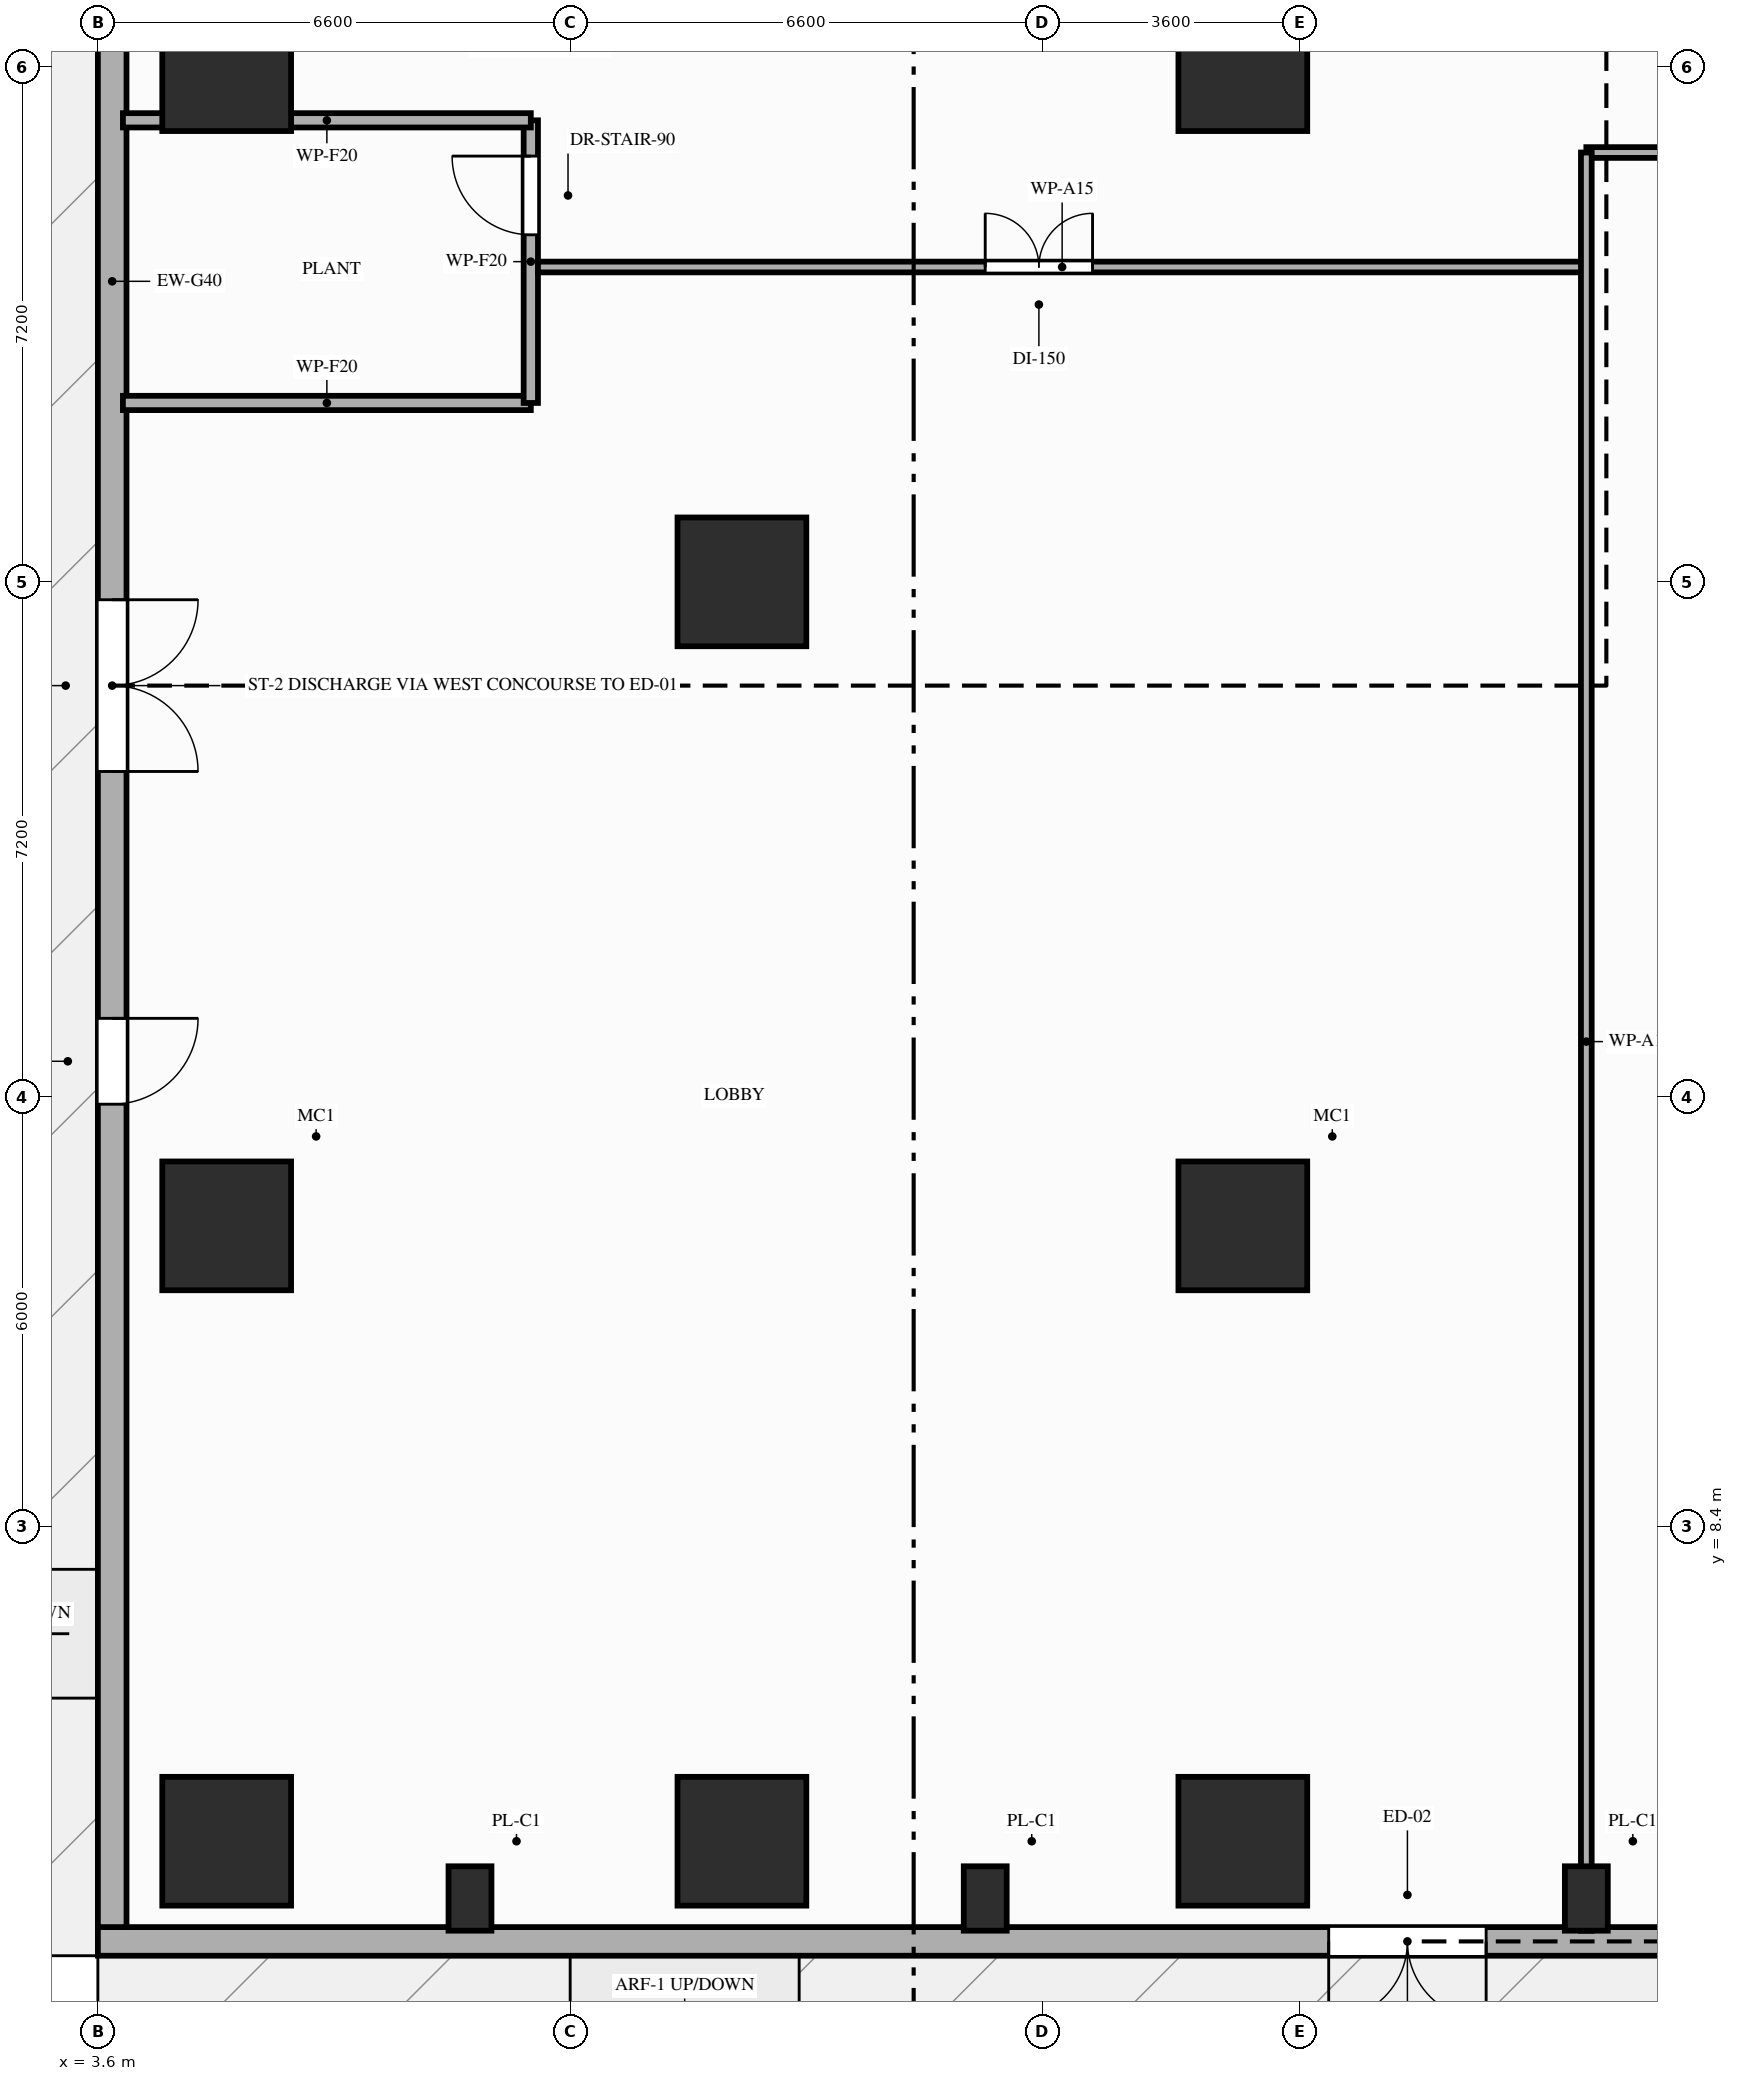
"""IFC4 building model, lengths in metres.
Left out: names, types, materials, properties, quantities, classifications, styles, units other than length and angle.
Written with IfcOpenShell. Run it as: python <this file> out.ifc"""

import sys

from ifc_helpers import new_model, si_unit, direction, frame, frame_2d, origin, origin_2d, place, context, subcontext, project, spatial, rectangle, extrude, element, fill, save


model = new_model("IFC4")
c1 = context("Model", 3, precision=1e-05, world=origin(), true_north=direction((0.0, 1.0)))
c2 = subcontext(c1, "Body", "Model", "MODEL_VIEW")
j1 = project(units=[si_unit("LENGTHUNIT", "METRE"), si_unit("PLANEANGLEUNIT", "RADIAN")], contexts=[c1])
p1 = place(None, origin())
s1 = spatial("IfcSite", under=j1, at=p1, CompositionType="ELEMENT")
p2 = place(p1, origin())
s2 = spatial("IfcBuilding", under=s1, at=p2, CompositionType="ELEMENT")
p3 = place(p2, origin())
s3 = spatial("IfcBuildingStorey", under=s2, at=p3, CompositionType="ELEMENT", Elevation=0.0)
for number, where, z_axis, x_axis in (
    (1, (5.4, 12.6, 0.0), (0.0, 0.0, 1.0), (1.0, 0.0, 0.0)),
    (2, (19.6, 12.6, 0.0), (0.0, 0.0, 1.0), (1.0, 0.0, 0.0)),
    (3, (5.4, 28.8, 0.0), (0.0, 0.0, 1.0), (1.0, 0.0, 0.0)),
    (4, (19.6, 28.8, 0.0), (0.0, 0.0, 1.0), (1.0, 0.0, 0.0)),
    (5, (5.4, 4.0, 0.0), (0.0, 0.0, 1.0), (1.0, 0.0, 0.0)),
    (6, (12.6, 4.0, 0.0), (0.0, 0.0, 1.0), (1.0, 0.0, 0.0)),
    (7, (19.6, 4.0, 0.0), (0.0, 0.0, 1.0), (1.0, 0.0, 0.0)),
    (8, (12.6, 21.6, 0.0), (0.0, 0.0, 1.0), (1.0, 0.0, 0.0)),
):
    element("IfcColumn", number, at=place(p3, frame(where, z_axis=z_axis, x_axis=x_axis)), inside=s3, PredefinedType="COLUMN", context=c2, shape_type="SweptSolid", body=[
        extrude(rectangle(XDim=1.8, YDim=1.8, at=origin_2d()), origin(), (0.0, 0.0, 1.0), 4.6),
    ])
for number, where, z_axis, x_axis in (
    (9, (8.8, 3.2, 0.0), (0.0, 0.0, 1.0), (1.0, 0.0, 0.0)),
    (10, (16.0, 3.2, 0.0), (0.0, 0.0, 1.0), (1.0, 0.0, 0.0)),
    (11, (24.4, 3.2, 0.0), (0.0, 0.0, 1.0), (1.0, 0.0, 0.0)),
):
    element("IfcColumn", number, at=place(p3, frame(where, z_axis=z_axis, x_axis=x_axis)), inside=s3, PredefinedType="PILASTER", context=c2, shape_type="SweptSolid", body=[
        extrude(rectangle(XDim=0.6, YDim=0.9, at=origin_2d()), origin(), (0.0, 0.0, 1.0), 4.6),
    ])
p4 = place(p3, frame((3.6, 2.6, 0.0), z_axis=(0.0, 0.0, 1.0), x_axis=(1.0, 0.0, 0.0)))
e12 = element("IfcWall", 12, at=p4, inside=s3, PredefinedType="STANDARD", context=c2, shape_type="SweptSolid", body=[
    extrude(rectangle(XDim=69.6, YDim=0.4, at=frame_2d((34.8, 0.0))), origin(), (0.0, 0.0, 1.0), 4.35),
])
p5 = place(p4, frame((24.6, 0.0, 0.9)))
e13 = element("IfcOpeningElement", 13, at=p5, cuts=e12, PredefinedType="OPENING", context=c2, shape_type="SweptSolid", body=[
    extrude(rectangle(XDim=2.8, YDim=2.2, at=frame_2d((1.4, 1.1))), frame((0.0, 0.21, 0.0), z_axis=(0.0, -1.0, 0.0), x_axis=(1.0, 0.0, 0.0)), (0.0, 0.0, 1.0), 0.42),
])
p6 = place(p4, frame((36.2, 0.0, 0.9)))
e14 = element("IfcOpeningElement", 14, at=p6, cuts=e12, PredefinedType="OPENING", context=c2, shape_type="SweptSolid", body=[
    extrude(rectangle(XDim=2.8, YDim=2.2, at=frame_2d((1.4, 1.1))), frame((0.0, 0.21, 0.0), z_axis=(0.0, -1.0, 0.0), x_axis=(1.0, 0.0, 0.0)), (0.0, 0.0, 1.0), 0.42),
])
p7 = place(p4, frame((64.0, 0.0, 0.9)))
e15 = element("IfcOpeningElement", 15, at=p7, cuts=e12, PredefinedType="OPENING", context=c2, shape_type="SweptSolid", body=[
    extrude(rectangle(XDim=2.8, YDim=2.2, at=frame_2d((1.4, 1.1))), frame((0.0, 0.21, 0.0), z_axis=(0.0, -1.0, 0.0), x_axis=(1.0, 0.0, 0.0)), (0.0, 0.0, 1.0), 0.42),
])
p8 = place(p4, frame((17.2, 0.0, 0.0)))
e16 = element("IfcOpeningElement", 16, at=p8, cuts=e12, PredefinedType="OPENING", context=c2, shape_type="SweptSolid", body=[
    extrude(rectangle(XDim=2.2, YDim=2.45, at=frame_2d((1.1, 1.225))), frame((0.0, 0.21, 0.0), z_axis=(0.0, -1.0, 0.0), x_axis=(1.0, 0.0, 0.0)), (0.0, 0.0, 1.0), 0.42),
])
p9 = place(p4, frame((48.4, 0.0, 0.0)))
e17 = element("IfcOpeningElement", 17, at=p9, cuts=e12, PredefinedType="OPENING", context=c2, shape_type="SweptSolid", body=[
    extrude(rectangle(XDim=2.0, YDim=2.4, at=frame_2d((1.0, 1.2))), frame((0.0, 0.21, 0.0), z_axis=(0.0, -1.0, 0.0), x_axis=(1.0, 0.0, 0.0)), (0.0, 0.0, 1.0), 0.42),
])
p10 = place(p3, frame((3.8, 48.8, 0.0), z_axis=(0.0, 0.0, 1.0), x_axis=(0.0, -1.0, 0.0)))
e18 = element("IfcWall", 18, at=p10, inside=s3, PredefinedType="STANDARD", context=c2, shape_type="SweptSolid", body=[
    extrude(rectangle(XDim=46.0, YDim=0.4, at=frame_2d((23.0, 0.0))), origin(), (0.0, 0.0, 1.0), 3.83),
])
p11 = place(p10, frame((27.45, 0.0, 0.0)))
e19 = element("IfcOpeningElement", 19, at=p11, cuts=e18, PredefinedType="OPENING", context=c2, shape_type="SweptSolid", body=[
    extrude(rectangle(XDim=2.4, YDim=2.5, at=frame_2d((1.2, 1.25))), frame((0.0, 0.21, 0.0), z_axis=(0.0, -1.0, 0.0), x_axis=(1.0, 0.0, 0.0)), (0.0, 0.0, 1.0), 0.42),
])
p12 = place(p10, frame((33.3, 0.0, 0.0)))
e20 = element("IfcOpeningElement", 20, at=p12, cuts=e18, PredefinedType="OPENING", context=c2, shape_type="SweptSolid", body=[
    extrude(rectangle(XDim=1.2, YDim=2.2, at=frame_2d((0.6, 1.1))), frame((0.0, 0.21, 0.0), z_axis=(0.0, -1.0, 0.0), x_axis=(1.0, 0.0, 0.0)), (0.0, 0.0, 1.0), 0.42),
])
p13 = place(p10, frame((12.8, 0.0, 0.0)))
e21 = element("IfcOpeningElement", 21, at=p13, cuts=e18, PredefinedType="OPENING", context=c2, shape_type="SweptSolid", body=[
    extrude(rectangle(XDim=1.2, YDim=2.2, at=frame_2d((0.6, 1.1))), frame((0.0, 0.21, 0.0), z_axis=(0.0, -1.0, 0.0), x_axis=(1.0, 0.0, 0.0)), (0.0, 0.0, 1.0), 0.42),
])
p14 = place(p3, frame((3.95, 24.1, 0.0), z_axis=(0.0, 0.0, 1.0), x_axis=(1.0, 0.0, 0.0)))
e22 = element("IfcWall", 22, at=p14, inside=s3, PredefinedType="PARTITIONING", context=c2, shape_type="SweptSolid", body=[
    extrude(rectangle(XDim=5.7, YDim=0.2, at=frame_2d((2.85, 0.0))), origin(), (0.0, 0.0, 1.0), 3.63),
])
p15 = place(p3, frame((9.65, 24.1, 0.0), z_axis=(0.0, 0.0, 1.0), x_axis=(0.0, 1.0, 0.0)))
e23 = element("IfcWall", 23, at=p15, inside=s3, PredefinedType="PARTITIONING", context=c2, shape_type="SweptSolid", body=[
    extrude(rectangle(XDim=3.95, YDim=0.2, at=frame_2d((1.975, 0.0))), origin(), (0.0, 0.0, 1.0), 4.35),
])
p16 = place(p15, frame((2.35, 0.0, 0.0)))
e24 = element("IfcOpeningElement", 24, at=p16, cuts=e23, PredefinedType="OPENING", context=c2, shape_type="SweptSolid", body=[
    extrude(rectangle(XDim=1.1, YDim=2.15, at=frame_2d((0.55, 1.075))), frame((0.0, 0.11, 0.0), z_axis=(0.0, -1.0, 0.0), x_axis=(1.0, 0.0, 0.0)), (0.0, 0.0, 1.0), 0.22),
])
p17 = place(p3, frame((3.95, 28.05, 0.0), z_axis=(0.0, 0.0, 1.0), x_axis=(1.0, 0.0, 0.0)))
e25 = element("IfcWall", 25, at=p17, inside=s3, PredefinedType="PARTITIONING", context=c2, shape_type="SweptSolid", body=[
    extrude(rectangle(XDim=5.7, YDim=0.2, at=frame_2d((2.85, 0.0))), origin(), (0.0, 0.0, 1.0), 3.63),
])
p18 = place(p3, frame((9.75, 26.0, 0.0), z_axis=(0.0, 0.0, 1.0), x_axis=(1.0, 0.0, 0.0)))
e26 = element("IfcWall", 26, at=p18, inside=s3, PredefinedType="PARTITIONING", context=c2, shape_type="SweptSolid", body=[
    extrude(rectangle(XDim=14.65, YDim=0.15, at=frame_2d((7.325, 0.0))), origin(), (0.0, 0.0, 1.0), 3.63),
])
p19 = place(p18, frame((6.25, 0.0, 0.0)))
e27 = element("IfcOpeningElement", 27, at=p19, cuts=e26, PredefinedType="OPENING", context=c2, shape_type="SweptSolid", body=[
    extrude(rectangle(XDim=1.5, YDim=2.18, at=frame_2d((0.75, 1.09))), frame((0.0, 0.085, 0.0), z_axis=(0.0, -1.0, 0.0), x_axis=(1.0, 0.0, 0.0)), (0.0, 0.0, 1.0), 0.17),
])
p20 = place(p3, frame((24.4, 27.6, 0.0), z_axis=(0.0, 0.0, 1.0), x_axis=(1.0, 0.0, 0.0)))
e28 = element("IfcWall", 28, at=p20, inside=s3, PredefinedType="PARTITIONING", context=c2, shape_type="SweptSolid", body=[
    extrude(rectangle(XDim=26.4, YDim=0.15, at=frame_2d((13.2, 0.0))), origin(), (0.0, 0.0, 1.0), 3.63),
])
p21 = place(p20, frame((7.6, 0.0, 0.0)))
e29 = element("IfcOpeningElement", 29, at=p21, cuts=e28, PredefinedType="OPENING", context=c2, shape_type="SweptSolid", body=[
    extrude(rectangle(XDim=1.5, YDim=2.18, at=frame_2d((0.75, 1.09))), frame((0.0, 0.085, 0.0), z_axis=(0.0, -1.0, 0.0), x_axis=(1.0, 0.0, 0.0)), (0.0, 0.0, 1.0), 0.17),
])
p22 = place(p3, frame((24.4, 2.75, 0.0), z_axis=(0.0, 0.0, 1.0), x_axis=(0.0, 1.0, 0.0)))
e30 = element("IfcWall", 30, at=p22, inside=s3, PredefinedType="PARTITIONING", context=c2, shape_type="SweptSolid", body=[
    extrude(rectangle(XDim=24.85, YDim=0.15, at=frame_2d((12.425, 0.0))), origin(), (0.0, 0.0, 1.0), 3.43),
])
p23 = place(p11, frame((2.4, 0.0, 0.0), z_axis=(0.0, 0.0, 1.0), x_axis=(-1.0, 0.0, 0.0)))
e31 = element("IfcDoor", 31, at=p23, inside=s3, OperationType="DOUBLE_DOOR_SINGLE_SWING", PredefinedType="DOOR", context=c2, shape_type="SweptSolid", body=[
    extrude(rectangle(XDim=2.4, YDim=2.5, at=frame_2d((1.2, 1.25))), frame((0.0, 0.025, 0.0), z_axis=(0.0, -1.0, 0.0), x_axis=(1.0, 0.0, 0.0)), (0.0, 0.0, 1.0), 0.05),
])
fill(e19, e31)
p24 = place(p12, frame((1.2, 0.0, 0.0), z_axis=(0.0, 0.0, 1.0), x_axis=(-1.0, 0.0, 0.0)))
e32 = element("IfcDoor", 32, at=p24, inside=s3, OperationType="SINGLE_SWING_LEFT", PredefinedType="DOOR", context=c2, shape_type="SweptSolid", body=[
    extrude(rectangle(XDim=1.2, YDim=2.2, at=frame_2d((0.6, 1.1))), frame((0.0, 0.025, 0.0), z_axis=(0.0, -1.0, 0.0), x_axis=(1.0, 0.0, 0.0)), (0.0, 0.0, 1.0), 0.05),
])
fill(e20, e32)
p25 = place(p8, frame((2.2, 0.0, 0.0), z_axis=(0.0, 0.0, 1.0), x_axis=(-1.0, 0.0, 0.0)))
e33 = element("IfcDoor", 33, at=p25, inside=s3, OperationType="DOUBLE_SWING_RIGHT", PredefinedType="DOOR", context=c2, shape_type="SweptSolid", body=[
    extrude(rectangle(XDim=2.2, YDim=2.45, at=frame_2d((1.1, 1.225))), frame((0.0, 0.025, 0.0), z_axis=(0.0, -1.0, 0.0), x_axis=(1.0, 0.0, 0.0)), (0.0, 0.0, 1.0), 0.05),
])
fill(e16, e33)
p26 = place(p16, origin())
e34 = element("IfcDoor", 34, at=p26, inside=s3, OperationType="SINGLE_SWING_RIGHT", PredefinedType="DOOR", context=c2, shape_type="SweptSolid", body=[
    extrude(rectangle(XDim=1.1, YDim=2.15, at=frame_2d((0.55, 1.075))), frame((0.0, 0.025, 0.0), z_axis=(0.0, -1.0, 0.0), x_axis=(1.0, 0.0, 0.0)), (0.0, 0.0, 1.0), 0.05),
])
fill(e24, e34)
p27 = place(p19, origin())
e35 = element("IfcDoor", 35, at=p27, inside=s3, OperationType="DOUBLE_DOOR_SINGLE_SWING", PredefinedType="DOOR", context=c2, shape_type="SweptSolid", body=[
    extrude(rectangle(XDim=1.5, YDim=2.18, at=frame_2d((0.75, 1.09))), frame((0.0, 0.025, 0.0), z_axis=(0.0, -1.0, 0.0), x_axis=(1.0, 0.0, 0.0)), (0.0, 0.0, 1.0), 0.05),
])
fill(e27, e35)
save(model, sys.argv[1])
